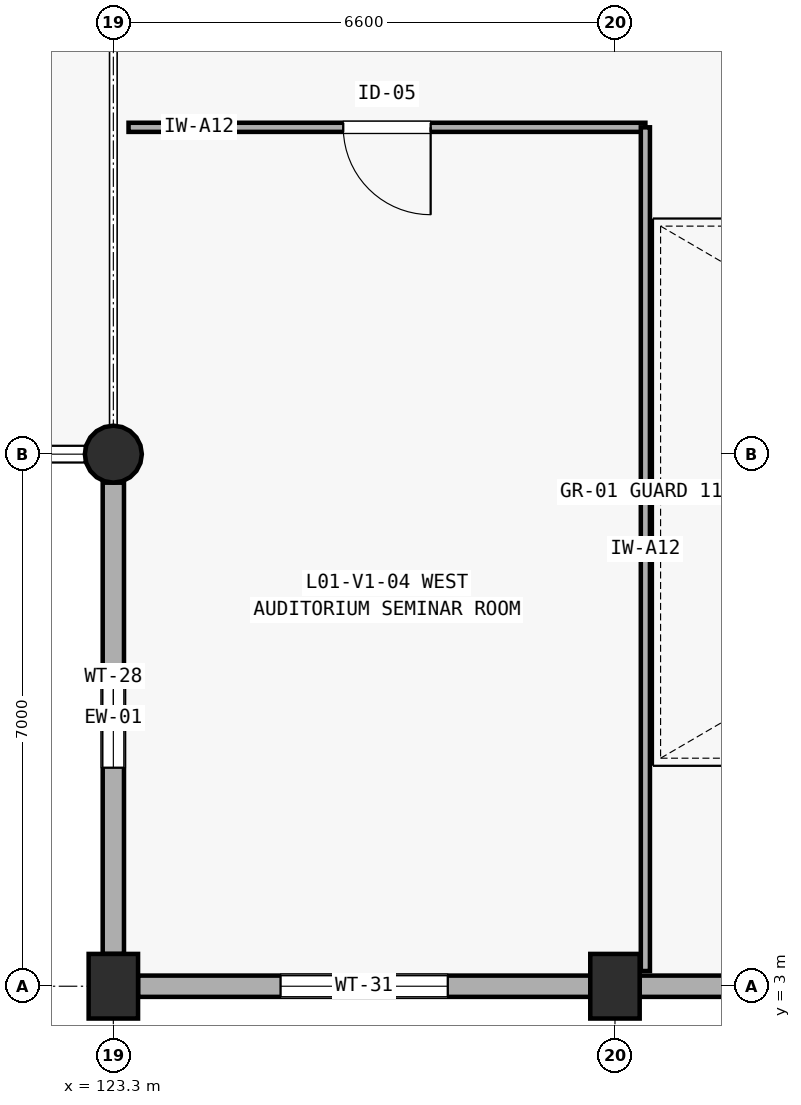
"""IFC4 building model, lengths in metres.
Left out: names, types, materials, properties, quantities, classifications, styles, units other than length and angle.
Written with IfcOpenShell. Run it as: python <this file> out.ifc"""

import sys

from ifc_helpers import new_model, si_unit, direction, frame, frame_2d, origin, origin_2d, place, context, subcontext, project, spatial, rectangle, circle, extrude, element, fill, save


model = new_model("IFC4")
c1 = context("Model", 3, precision=1e-05, world=origin(), true_north=direction((0.0, 1.0)))
c2 = subcontext(c1, "Body", "Model", "MODEL_VIEW")
j1 = project(units=[si_unit("LENGTHUNIT", "METRE"), si_unit("PLANEANGLEUNIT", "RADIAN")], contexts=[c1])
p1 = place(None, origin())
s1 = spatial("IfcSite", under=j1, at=p1, CompositionType="ELEMENT")
p2 = place(p1, origin())
s2 = spatial("IfcBuilding", under=s1, at=p2, CompositionType="ELEMENT")
p3 = place(p2, frame((0.0, 0.0, 4.2)))
s3 = spatial("IfcBuildingStorey", under=s2, at=p3, CompositionType="ELEMENT", Elevation=4.2)
p4 = place(p3, frame((123.3, 3.0, 0.0), z_axis=(0.0, 0.0, 1.0), x_axis=(1.0, 0.0, 0.0)))
e1 = element("IfcColumn", 1, at=p4, inside=s3, PredefinedType="COLUMN", context=c2, shape_type="SweptSolid", body=[
    extrude(rectangle(XDim=0.65, YDim=0.85, at=origin_2d()), origin(), (0.0, 0.0, 1.0), 4.2),
])
p5 = place(p3, frame((123.3, 10.0, 0.0), z_axis=(0.0, 0.0, 1.0), x_axis=(1.0, 0.0, 0.0)))
e2 = element("IfcColumn", 2, at=p5, inside=s3, PredefinedType="COLUMN", context=c2, shape_type="SweptSolid", body=[
    extrude(circle(Radius=0.375, at=origin_2d()), origin(), (0.0, 0.0, 1.0), 4.2),
])
p6 = place(p3, frame((129.9, 3.0, 0.0), z_axis=(0.0, 0.0, 1.0), x_axis=(1.0, 0.0, 0.0)))
e3 = element("IfcColumn", 3, at=p6, inside=s3, PredefinedType="COLUMN", context=c2, shape_type="SweptSolid", body=[
    extrude(rectangle(XDim=0.65, YDim=0.85, at=origin_2d()), origin(), (0.0, 0.0, 1.0), 4.2),
])
p7 = place(p3, frame((123.625, 3.0, 0.0), z_axis=(0.0, 0.0, 1.0), x_axis=(1.0, 0.0, 0.0)))
e4 = element("IfcWall", 4, at=p7, inside=s3, PredefinedType="SOLIDWALL", context=c2, shape_type="SweptSolid", body=[
    extrude(rectangle(XDim=5.95, YDim=0.28, at=frame_2d((2.975, 0.0))), origin(), (0.0, 0.0, 1.0), 3.285),
])
p8 = place(p7, frame((1.875, 0.0, 0.85)))
e5 = element("IfcOpeningElement", 5, at=p8, cuts=e4, PredefinedType="OPENING", context=c2, shape_type="SweptSolid", body=[
    extrude(rectangle(XDim=2.2, YDim=1.2, at=frame_2d((1.1, 0.6))), frame((0.0, 0.15, 0.0), z_axis=(0.0, -1.0, 0.0), x_axis=(1.0, 0.0, 0.0)), (0.0, 0.0, 1.0), 0.3),
])
p9 = place(p3, frame((130.225, 3.0, 0.0), z_axis=(0.0, 0.0, 1.0), x_axis=(1.0, 0.0, 0.0)))
e6 = element("IfcWall", 6, at=p9, inside=s3, PredefinedType="SOLIDWALL", context=c2, shape_type="SweptSolid", body=[
    extrude(rectangle(XDim=5.95, YDim=0.28, at=frame_2d((2.975, 0.0))), origin(), (0.0, 0.0, 1.0), 3.285),
])
p10 = place(p9, frame((1.475, 0.0, 0.85)))
e7 = element("IfcOpeningElement", 7, at=p10, cuts=e6, PredefinedType="OPENING", context=c2, shape_type="SweptSolid", body=[
    extrude(rectangle(XDim=3.0, YDim=1.2, at=frame_2d((1.5, 0.6))), frame((0.0, 0.15, 0.0), z_axis=(0.0, -1.0, 0.0), x_axis=(1.0, 0.0, 0.0)), (0.0, 0.0, 1.0), 0.3),
])
p11 = place(p3, frame((123.3, 3.425, 0.0), z_axis=(0.0, 0.0, 1.0), x_axis=(0.0, 1.0, 0.0)))
e8 = element("IfcWall", 8, at=p11, inside=s3, PredefinedType="SOLIDWALL", context=c2, shape_type="SweptSolid", body=[
    extrude(rectangle(XDim=6.2, YDim=0.28, at=frame_2d((3.1, 0.0))), origin(), (0.0, 0.0, 1.0), 3.85),
])
p12 = place(p11, frame((2.45, 0.0, 0.85)))
e9 = element("IfcOpeningElement", 9, at=p12, cuts=e8, PredefinedType="OPENING", context=c2, shape_type="SweptSolid", body=[
    extrude(rectangle(XDim=1.3, YDim=1.45, at=frame_2d((0.65, 0.725))), frame((0.0, 0.15, 0.0), z_axis=(0.0, -1.0, 0.0), x_axis=(1.0, 0.0, 0.0)), (0.0, 0.0, 1.0), 0.3),
])
p13 = place(p3, frame((123.5, 14.3, 0.0), z_axis=(0.0, 0.0, 1.0), x_axis=(1.0, 0.0, 0.0)))
e10 = element("IfcWall", 10, at=p13, inside=s3, PredefinedType="PARTITIONING", context=c2, shape_type="SweptSolid", body=[
    extrude(rectangle(XDim=6.8, YDim=0.12, at=frame_2d((3.4, 0.0))), origin(), (0.0, 0.0, 1.0), 3.9),
])
p14 = place(p13, frame((2.825, 0.0, 0.0)))
e11 = element("IfcOpeningElement", 11, at=p14, cuts=e10, PredefinedType="OPENING", context=c2, shape_type="SweptSolid", body=[
    extrude(rectangle(XDim=1.15, YDim=2.15, at=frame_2d((0.575, 1.075))), frame((0.0, 0.07, 0.0), z_axis=(0.0, -1.0, 0.0), x_axis=(1.0, 0.0, 0.0)), (0.0, 0.0, 1.0), 0.14),
])
p15 = place(p3, frame((130.3, 3.2, 0.0), z_axis=(0.0, 0.0, 1.0), x_axis=(0.0, 1.0, 0.0)))
e12 = element("IfcWall", 12, at=p15, inside=s3, PredefinedType="PARTITIONING", context=c2, shape_type="SweptSolid", body=[
    extrude(rectangle(XDim=11.1, YDim=0.12, at=frame_2d((5.55, 0.0))), origin(), (0.0, 0.0, 1.0), 3.9),
])
p16 = place(p8, origin())
e13 = element("IfcWindow", 13, at=p16, inside=s3, PartitioningType="SINGLE_PANEL", PredefinedType="WINDOW", context=c2, shape_type="SweptSolid", body=[
    extrude(rectangle(XDim=2.2, YDim=1.2, at=frame_2d((1.1, 0.6))), frame((0.0, 0.03, 0.0), z_axis=(0.0, -1.0, 0.0), x_axis=(1.0, 0.0, 0.0)), (0.0, 0.0, 1.0), 0.06),
])
fill(e5, e13)
p17 = place(p12, origin())
e14 = element("IfcWindow", 14, at=p17, inside=s3, PartitioningType="SINGLE_PANEL", PredefinedType="WINDOW", context=c2, shape_type="SweptSolid", body=[
    extrude(rectangle(XDim=1.3, YDim=1.45, at=frame_2d((0.65, 0.725))), frame((0.0, 0.03, 0.0), z_axis=(0.0, -1.0, 0.0), x_axis=(1.0, 0.0, 0.0)), (0.0, 0.0, 1.0), 0.06),
])
fill(e9, e14)
p18 = place(p14, frame((1.15, 0.0, 0.0), z_axis=(0.0, 0.0, 1.0), x_axis=(-1.0, 0.0, 0.0)))
e15 = element("IfcDoor", 15, at=p18, inside=s3, OperationType="SINGLE_SWING_LEFT", PredefinedType="DOOR", context=c2, shape_type="SweptSolid", body=[
    extrude(rectangle(XDim=1.15, YDim=2.15, at=frame_2d((0.575, 1.075))), frame((0.0, 0.025, 0.0), z_axis=(0.0, -1.0, 0.0), x_axis=(1.0, 0.0, 0.0)), (0.0, 0.0, 1.0), 0.05),
])
fill(e11, e15)
save(model, sys.argv[1])
